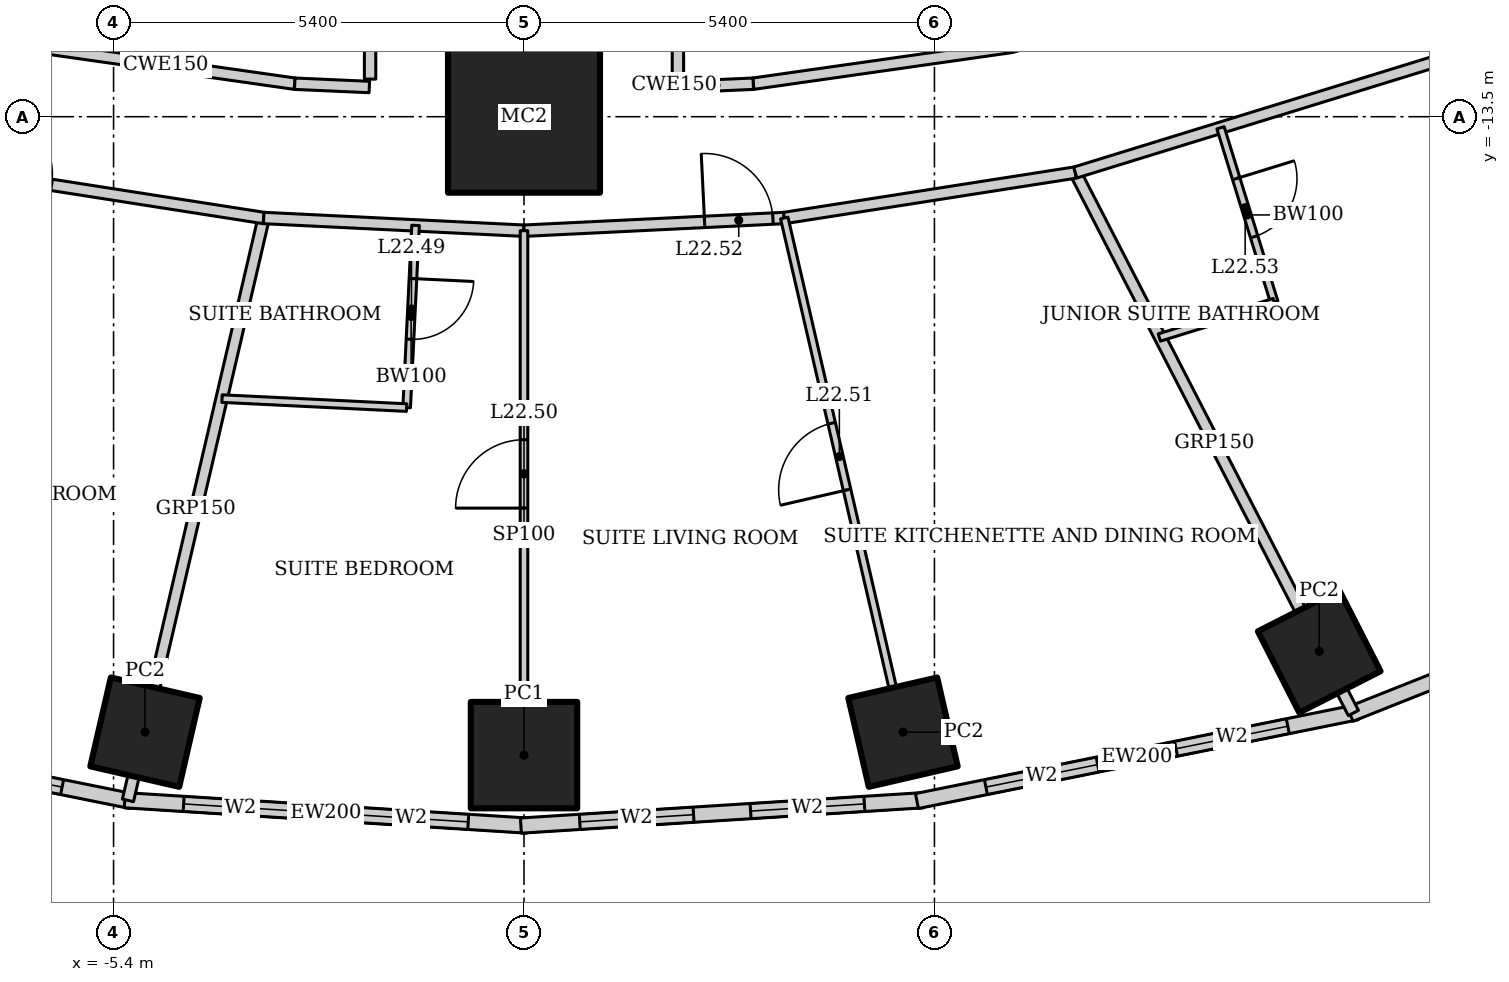
"""IFC4 building model, lengths in metres.
Left out: names, types, materials, properties, quantities, classifications, styles, units other than length and angle.
Written with IfcOpenShell. Run it as: python <this file> out.ifc"""

import sys

from ifc_helpers import new_model, si_unit, direction, frame, frame_2d, origin, origin_2d, place, context, subcontext, project, spatial, rectangle, hollow_rectangle, extrude, element, fill, save


model = new_model("IFC4")
c1 = context("Model", 3, precision=1e-05, world=origin(), true_north=direction((0.0, 1.0)))
c2 = subcontext(c1, "Body", "Model", "MODEL_VIEW")
j1 = project(units=[si_unit("LENGTHUNIT", "METRE"), si_unit("PLANEANGLEUNIT", "RADIAN")], contexts=[c1])
p1 = place(None, origin())
s1 = spatial("IfcSite", under=j1, at=p1, CompositionType="ELEMENT")
p2 = place(p1, origin())
s2 = spatial("IfcBuilding", under=s1, at=p2, CompositionType="ELEMENT")
p3 = place(p2, frame((0.0, 0.0, 94.6)))
s3 = spatial("IfcBuildingStorey", under=s2, at=p3, CompositionType="ELEMENT", Elevation=94.6)
p4 = place(p3, frame((0.0, -13.5, 0.0), z_axis=(0.0, 0.0, 1.0), x_axis=(1.0, 0.0, 0.0)))
e1 = element("IfcColumn", 1, at=p4, inside=s3, PredefinedType="COLUMN", context=c2, shape_type="SweptSolid", body=[
    extrude(hollow_rectangle(XDim=2.0, YDim=2.0, WallThickness=0.17, at=origin_2d()), origin(), (0.0, 0.0, 1.0), 3.6),
])
p5 = place(p3, frame((-4.986, -21.598, 0.0), z_axis=(0.0, 0.0, 1.0), x_axis=(0.224951054344, 0.974370064785, 0.0)))
e2 = element("IfcColumn", 2, at=p5, inside=s3, PredefinedType="COLUMN", context=c2, shape_type="SweptSolid", body=[
    extrude(hollow_rectangle(XDim=1.2, YDim=1.2, WallThickness=0.1, at=origin_2d()), origin(), (0.0, 0.0, 1.0), 3.6),
])
p6 = place(p3, frame((0.0, -21.9, 0.0), z_axis=(0.0, 0.0, 1.0), x_axis=(1.0, 0.0, 0.0)))
e3 = element("IfcColumn", 3, at=p6, inside=s3, PredefinedType="COLUMN", context=c2, shape_type="SweptSolid", body=[
    extrude(hollow_rectangle(XDim=1.4, YDim=1.4, WallThickness=0.1, at=origin_2d()), origin(), (0.0, 0.0, 1.0), 3.6),
])
for number, where, z_axis, x_axis in (
    (4, (4.986, -21.598, 0.0), (0.0, 0.0, 1.0), (0.974, 0.225, 0.0)),
    (5, (10.463, -20.534, 0.0), (0.0, 0.0, 1.0), (0.891, 0.454, 0.0)),
):
    element("IfcColumn", number, at=place(p3, frame(where, z_axis=z_axis, x_axis=x_axis)), inside=s3, PredefinedType="COLUMN", context=c2, shape_type="SweptSolid", body=[
        extrude(hollow_rectangle(XDim=1.2, YDim=1.2, WallThickness=0.1, at=origin_2d()), origin(), (0.0, 0.0, 1.0), 3.6),
    ])
p7 = place(p3, frame((-10.957, -21.337, 0.0), z_axis=(0.0, 0.0, 1.0), x_axis=(0.980251657452, -0.197754110105, 0.0)))
e6 = element("IfcWall", 6, at=p7, inside=s3, PredefinedType="SOLIDWALL", context=c2, shape_type="SweptSolid", body=[
    extrude(rectangle(XDim=5.904, YDim=0.2, at=frame_2d((2.952, 0.0))), origin(), (0.0, 0.0, 1.0), 3.45),
])
p8 = place(p7, frame((0.926, 0.0, 0.5)))
e7 = element("IfcOpeningElement", 7, at=p8, cuts=e6, PredefinedType="OPENING", context=c2, shape_type="SweptSolid", body=[
    extrude(rectangle(XDim=1.5, YDim=2.2, at=frame_2d((0.75, 1.1))), frame((0.0, 0.11, 0.0), z_axis=(0.0, -1.0, 0.0), x_axis=(1.0, 0.0, 0.0)), (0.0, 0.0, 1.0), 0.22),
])
p9 = place(p7, frame((3.478, 0.0, 0.5)))
e8 = element("IfcOpeningElement", 8, at=p9, cuts=e6, PredefinedType="OPENING", context=c2, shape_type="SweptSolid", body=[
    extrude(rectangle(XDim=1.5, YDim=2.2, at=frame_2d((0.75, 1.1))), frame((0.0, 0.11, 0.0), z_axis=(0.0, -1.0, 0.0), x_axis=(1.0, 0.0, 0.0)), (0.0, 0.0, 1.0), 0.22),
])
p10 = place(p3, frame((-5.253, -22.493, 0.0), z_axis=(0.0, 0.0, 1.0), x_axis=(0.998018582375, -0.062919863585, 0.0)))
e9 = element("IfcWall", 9, at=p10, inside=s3, PredefinedType="SOLIDWALL", context=c2, shape_type="SweptSolid", body=[
    extrude(rectangle(XDim=5.304, YDim=0.2, at=frame_2d((2.652, 0.0))), origin(), (0.0, 0.0, 1.0), 3.45),
])
p11 = place(p10, frame((0.776, 0.0, 0.5)))
e10 = element("IfcOpeningElement", 10, at=p11, cuts=e9, PredefinedType="OPENING", context=c2, shape_type="SweptSolid", body=[
    extrude(rectangle(XDim=1.5, YDim=2.2, at=frame_2d((0.75, 1.1))), frame((0.0, 0.11, 0.0), z_axis=(0.0, -1.0, 0.0), x_axis=(1.0, 0.0, 0.0)), (0.0, 0.0, 1.0), 0.22),
])
p12 = place(p10, frame((3.028, 0.0, 0.5)))
e11 = element("IfcOpeningElement", 11, at=p12, cuts=e9, PredefinedType="OPENING", context=c2, shape_type="SweptSolid", body=[
    extrude(rectangle(XDim=1.5, YDim=2.2, at=frame_2d((0.75, 1.1))), frame((0.0, 0.11, 0.0), z_axis=(0.0, -1.0, 0.0), x_axis=(1.0, 0.0, 0.0)), (0.0, 0.0, 1.0), 0.22),
])
p13 = place(p3, frame((-0.041, -22.827, 0.0), z_axis=(0.0, 0.0, 1.0), x_axis=(0.998018582375, 0.062919863585, 0.0)))
e12 = element("IfcWall", 12, at=p13, inside=s3, PredefinedType="SOLIDWALL", context=c2, shape_type="SweptSolid", body=[
    extrude(rectangle(XDim=5.304, YDim=0.2, at=frame_2d((2.652, 0.0))), origin(), (0.0, 0.0, 1.0), 3.45),
])
p14 = place(p13, frame((0.776, 0.0, 0.5)))
e13 = element("IfcOpeningElement", 13, at=p14, cuts=e12, PredefinedType="OPENING", context=c2, shape_type="SweptSolid", body=[
    extrude(rectangle(XDim=1.5, YDim=2.2, at=frame_2d((0.75, 1.1))), frame((0.0, 0.11, 0.0), z_axis=(0.0, -1.0, 0.0), x_axis=(1.0, 0.0, 0.0)), (0.0, 0.0, 1.0), 0.22),
])
p15 = place(p13, frame((3.028, 0.0, 0.5)))
e14 = element("IfcOpeningElement", 14, at=p15, cuts=e12, PredefinedType="OPENING", context=c2, shape_type="SweptSolid", body=[
    extrude(rectangle(XDim=1.5, YDim=2.2, at=frame_2d((0.75, 1.1))), frame((0.0, 0.11, 0.0), z_axis=(0.0, -1.0, 0.0), x_axis=(1.0, 0.0, 0.0)), (0.0, 0.0, 1.0), 0.22),
])
p16 = place(p3, frame((5.17, -22.504, 0.0), z_axis=(0.0, 0.0, 1.0), x_axis=(0.980251657452, 0.197754110105, 0.0)))
e15 = element("IfcWall", 15, at=p16, inside=s3, PredefinedType="SOLIDWALL", context=c2, shape_type="SweptSolid", body=[
    extrude(rectangle(XDim=5.904, YDim=0.2, at=frame_2d((2.952, 0.0))), origin(), (0.0, 0.0, 1.0), 3.45),
])
p17 = place(p16, frame((0.926, 0.0, 0.5)))
e16 = element("IfcOpeningElement", 16, at=p17, cuts=e15, PredefinedType="OPENING", context=c2, shape_type="SweptSolid", body=[
    extrude(rectangle(XDim=1.5, YDim=2.2, at=frame_2d((0.75, 1.1))), frame((0.0, 0.11, 0.0), z_axis=(0.0, -1.0, 0.0), x_axis=(1.0, 0.0, 0.0)), (0.0, 0.0, 1.0), 0.22),
])
p18 = place(p16, frame((3.478, 0.0, 0.5)))
e17 = element("IfcOpeningElement", 17, at=p18, cuts=e15, PredefinedType="OPENING", context=c2, shape_type="SweptSolid", body=[
    extrude(rectangle(XDim=1.5, YDim=2.2, at=frame_2d((0.75, 1.1))), frame((0.0, 0.11, 0.0), z_axis=(0.0, -1.0, 0.0), x_axis=(1.0, 0.0, 0.0)), (0.0, 0.0, 1.0), 0.22),
])
p19 = place(p3, frame((10.869, -21.363, 0.0), z_axis=(0.0, 0.0, 1.0), x_axis=(0.929358351251, 0.369178892895, 0.0)))
e18 = element("IfcWall", 18, at=p19, inside=s3, PredefinedType="SOLIDWALL", context=c2, shape_type="SweptSolid", body=[
    extrude(rectangle(XDim=7.692, YDim=0.2, at=frame_2d((3.846, 0.0))), origin(), (0.0, 0.0, 1.0), 3.45),
])
p20 = place(p19, frame((1.373, 0.0, 0.5)))
e19 = element("IfcOpeningElement", 19, at=p20, cuts=e18, PredefinedType="OPENING", context=c2, shape_type="SweptSolid", body=[
    extrude(rectangle(XDim=1.5, YDim=2.2, at=frame_2d((0.75, 1.1))), frame((0.0, 0.11, 0.0), z_axis=(0.0, -1.0, 0.0), x_axis=(1.0, 0.0, 0.0)), (0.0, 0.0, 1.0), 0.22),
])
p21 = place(p19, frame((4.819, 0.0, 0.5)))
e20 = element("IfcOpeningElement", 20, at=p21, cuts=e18, PredefinedType="OPENING", context=c2, shape_type="SweptSolid", body=[
    extrude(rectangle(XDim=1.5, YDim=2.2, at=frame_2d((0.75, 1.1))), frame((0.0, 0.11, 0.0), z_axis=(0.0, -1.0, 0.0), x_axis=(1.0, 0.0, 0.0)), (0.0, 0.0, 1.0), 0.22),
])
p22 = place(p3, frame((-5.211, -22.496, 0.0), z_axis=(0.0, 0.0, 1.0), x_axis=(0.227056984461, 0.973881474209, 0.0)))
e21 = element("IfcWall", 21, at=p22, inside=s3, PredefinedType="PARTITIONING", context=c2, shape_type="SweptSolid", body=[
    extrude(rectangle(XDim=7.869, YDim=0.15, at=frame_2d((3.934, 0.0))), origin(), (0.0, 0.0, 1.0), 2.767),
])
p23 = place(p3, frame((10.912, -21.346, 0.0), z_axis=(0.0, 0.0, 1.0), x_axis=(-0.45752665959, 0.889195904042, 0.0)))
e22 = element("IfcWall", 22, at=p23, inside=s3, PredefinedType="PARTITIONING", context=c2, shape_type="SweptSolid", body=[
    extrude(rectangle(XDim=7.997, YDim=0.15, at=frame_2d((3.999, 0.0))), origin(), (0.0, 0.0, 1.0), 2.528),
])
p24 = place(p3, frame((-7.253, -14.235, 0.0), z_axis=(0.0, 0.0, 1.0), x_axis=(0.988015036573, -0.154357660987, 0.0)))
e23 = element("IfcWall", 23, at=p24, inside=s3, PredefinedType="PARTITIONING", context=c2, shape_type="SweptSolid", body=[
    extrude(rectangle(XDim=3.875, YDim=0.15, at=frame_2d((1.938, 0.0))), origin(), (0.0, 0.0, 1.0), 3.45),
])
p25 = place(p24, frame((0.15, 0.0, 0.0)))
e24 = element("IfcOpeningElement", 24, at=p25, cuts=e23, PredefinedType="OPENING", context=c2, shape_type="SweptSolid", body=[
    extrude(rectangle(XDim=0.9, YDim=2.1, at=frame_2d((0.45, 1.05))), frame((0.0, 0.085, 0.0), z_axis=(0.0, -1.0, 0.0), x_axis=(1.0, 0.0, 0.0)), (0.0, 0.0, 1.0), 0.17),
])
p26 = place(p3, frame((-3.424, -14.833, 0.0), z_axis=(0.0, 0.0, 1.0), x_axis=(0.998809560203, -0.048779733975, 0.0)))
e25 = element("IfcWall", 25, at=p26, inside=s3, PredefinedType="PARTITIONING", context=c2, shape_type="SweptSolid", body=[
    extrude(rectangle(XDim=3.428, YDim=0.15, at=frame_2d((1.714, 0.0))), origin(), (0.0, 0.0, 1.0), 3.45),
])
p27 = place(p3, frame((0.0, -15.0, 0.0), z_axis=(0.0, 0.0, 1.0), x_axis=(0.998809560203, 0.048779733975, 0.0)))
e26 = element("IfcWall", 26, at=p27, inside=s3, PredefinedType="PARTITIONING", context=c2, shape_type="SweptSolid", body=[
    extrude(rectangle(XDim=3.428, YDim=0.15, at=frame_2d((1.714, 0.0))), origin(), (0.0, 0.0, 1.0), 3.45),
])
p28 = place(p27, frame((2.378, 0.0, 0.0)))
e27 = element("IfcOpeningElement", 27, at=p28, cuts=e26, PredefinedType="OPENING", context=c2, shape_type="SweptSolid", body=[
    extrude(rectangle(XDim=0.9, YDim=2.1, at=frame_2d((0.45, 1.05))), frame((0.0, 0.085, 0.0), z_axis=(0.0, -1.0, 0.0), x_axis=(1.0, 0.0, 0.0)), (0.0, 0.0, 1.0), 0.17),
])
p29 = place(p3, frame((3.424, -14.833, 0.0), z_axis=(0.0, 0.0, 1.0), x_axis=(0.988015036573, 0.154357660987, 0.0)))
e28 = element("IfcWall", 28, at=p29, inside=s3, PredefinedType="PARTITIONING", context=c2, shape_type="SweptSolid", body=[
    extrude(rectangle(XDim=3.875, YDim=0.15, at=frame_2d((1.938, 0.0))), origin(), (0.0, 0.0, 1.0), 3.45),
])
p30 = place(p3, frame((7.253, -14.235, 0.0), z_axis=(0.0, 0.0, 1.0), x_axis=(0.955657956744, 0.294478980085, 0.0)))
e29 = element("IfcWall", 29, at=p30, inside=s3, PredefinedType="PARTITIONING", context=c2, shape_type="SweptSolid", body=[
    extrude(rectangle(XDim=5.236, YDim=0.15, at=frame_2d((2.618, 0.0))), origin(), (0.0, 0.0, 1.0), 3.45),
])
for number, where, z_axis, x_axis in (
    (30, (-6.411, -12.582, 0.0), (0.0, 0.0, 1.0), (0.99, -0.141, 0.0)),
    (31, (3.016, -13.066, 0.0), (0.0, 0.0, 1.0), (0.99, 0.141, 0.0)),
):
    element("IfcWall", number, at=place(p3, frame(where, z_axis=z_axis, x_axis=x_axis)), inside=s3, PredefinedType="PARTITIONING", context=c2, shape_type="SweptSolid", body=[
        extrude(rectangle(XDim=3.429, YDim=0.15, at=frame_2d((1.714, 0.0))), origin(), (0.0, 0.0, 1.0), 3.45),
    ])
p31 = place(p3, frame((6.411, -12.582, 0.0), z_axis=(0.0, 0.0, 1.0), x_axis=(0.962643729928, 0.270771211967, 0.0)))
e32 = element("IfcWall", 32, at=p31, inside=s3, PredefinedType="PARTITIONING", context=c2, shape_type="SweptSolid", body=[
    extrude(rectangle(XDim=4.688, YDim=0.15, at=frame_2d((2.344, 0.0))), origin(), (0.0, 0.0, 1.0), 3.45),
])
p32 = place(p31, frame((1.894, 0.0, 0.0)))
e33 = element("IfcOpeningElement", 33, at=p32, cuts=e32, PredefinedType="OPENING", context=c2, shape_type="SweptSolid", body=[
    extrude(rectangle(XDim=0.9, YDim=2.1, at=frame_2d((0.45, 1.05))), frame((0.0, 0.085, 0.0), z_axis=(0.0, -1.0, 0.0), x_axis=(1.0, 0.0, 0.0)), (0.0, 0.0, 1.0), 0.17),
])
p33 = place(p3, frame((-1.427, -14.93, 0.0), z_axis=(0.0, 0.0, 1.0), x_axis=(-0.048831470304, -0.998807032168, 0.0)))
e34 = element("IfcWall", 34, at=p33, inside=s3, PredefinedType="PARTITIONING", context=c2, shape_type="SweptSolid", body=[
    extrude(rectangle(XDim=2.4, YDim=0.1, at=frame_2d((1.2, 0.0))), origin(), (0.0, 0.0, 1.0), 3.45),
])
p34 = place(p33, frame((0.7, 0.0, 0.0)))
e35 = element("IfcOpeningElement", 35, at=p34, cuts=e34, PredefinedType="OPENING", context=c2, shape_type="SweptSolid", body=[
    extrude(rectangle(XDim=0.8, YDim=2.1, at=frame_2d((0.4, 1.05))), frame((0.0, 0.06, 0.0), z_axis=(0.0, -1.0, 0.0), x_axis=(1.0, 0.0, 0.0)), (0.0, 0.0, 1.0), 0.12),
])
p35 = place(p3, frame((-1.544, -17.327, 0.0), z_axis=(0.0, 0.0, 1.0), x_axis=(-0.998813899717, 0.048690797202, 0.0)))
e36 = element("IfcWall", 36, at=p35, inside=s3, PredefinedType="PARTITIONING", context=c2, shape_type="SweptSolid", body=[
    extrude(rectangle(XDim=2.432, YDim=0.1, at=frame_2d((1.216, 0.0))), origin(), (0.0, 0.0, 1.0), 3.45),
])
p36 = place(p3, frame((0.0, -21.4, 0.0), z_axis=(0.0, 0.0, 1.0), x_axis=(0.0, 1.0, 0.0)))
e37 = element("IfcWall", 37, at=p36, inside=s3, PredefinedType="PARTITIONING", context=c2, shape_type="SweptSolid", body=[
    extrude(rectangle(XDim=6.4, YDim=0.1, at=frame_2d((3.2, 0.0))), origin(), (0.0, 0.0, 1.0), 2.924),
])
p37 = place(p36, frame((2.75, 0.0, 0.0)))
e38 = element("IfcOpeningElement", 38, at=p37, cuts=e37, PredefinedType="OPENING", context=c2, shape_type="SweptSolid", body=[
    extrude(rectangle(XDim=0.9, YDim=2.1, at=frame_2d((0.45, 1.05))), frame((0.0, 0.06, 0.0), z_axis=(0.0, -1.0, 0.0), x_axis=(1.0, 0.0, 0.0)), (0.0, 0.0, 1.0), 0.12),
])
p38 = place(p3, frame((4.874, -21.111, 0.0), z_axis=(0.0, 0.0, 1.0), x_axis=(-0.224959129168, 0.97436820053, 0.0)))
e39 = element("IfcWall", 39, at=p38, inside=s3, PredefinedType="PARTITIONING", context=c2, shape_type="SweptSolid", body=[
    extrude(rectangle(XDim=6.443, YDim=0.1, at=frame_2d((3.222, 0.0))), origin(), (0.0, 0.0, 1.0), 2.767),
])
p39 = place(p38, frame((2.771, 0.0, 0.0)))
e40 = element("IfcOpeningElement", 40, at=p39, cuts=e39, PredefinedType="OPENING", context=c2, shape_type="SweptSolid", body=[
    extrude(rectangle(XDim=0.9, YDim=2.1, at=frame_2d((0.45, 1.05))), frame((0.0, 0.06, 0.0), z_axis=(0.0, -1.0, 0.0), x_axis=(1.0, 0.0, 0.0)), (0.0, 0.0, 1.0), 0.12),
])
p40 = place(p3, frame((9.164, -13.646, 0.0), z_axis=(0.0, 0.0, 1.0), x_axis=(0.294507586191, -0.955649141514, 0.0)))
e41 = element("IfcWall", 41, at=p40, inside=s3, PredefinedType="PARTITIONING", context=c2, shape_type="SweptSolid", body=[
    extrude(rectangle(XDim=2.4, YDim=0.1, at=frame_2d((1.2, 0.0))), origin(), (0.0, 0.0, 1.0), 3.45),
])
p41 = place(p40, frame((0.7, 0.0, 0.0)))
e42 = element("IfcOpeningElement", 42, at=p41, cuts=e41, PredefinedType="OPENING", context=c2, shape_type="SweptSolid", body=[
    extrude(rectangle(XDim=0.8, YDim=2.1, at=frame_2d((0.4, 1.05))), frame((0.0, 0.06, 0.0), z_axis=(0.0, -1.0, 0.0), x_axis=(1.0, 0.0, 0.0)), (0.0, 0.0, 1.0), 0.12),
])
p42 = place(p3, frame((9.871, -15.939, 0.0), z_axis=(0.0, 0.0, 1.0), x_axis=(-0.955642133669, -0.29453032502, 0.0)))
e43 = element("IfcWall", 43, at=p42, inside=s3, PredefinedType="PARTITIONING", context=c2, shape_type="SweptSolid", body=[
    extrude(rectangle(XDim=1.583, YDim=0.1, at=frame_2d((0.791, 0.0))), origin(), (0.0, 0.0, 1.0), 3.45),
])
for number, where, z_axis, x_axis in (
    (44, (-3.016, -13.066, 0.0), (0.0, 0.0, 1.0), (0.999, -0.044, 0.0)),
    (45, (2.035, -13.109, 0.0), (0.0, 0.0, 1.0), (0.999, 0.044, 0.0)),
):
    element("IfcWall", number, at=place(p3, frame(where, z_axis=z_axis, x_axis=x_axis)), inside=s3, PredefinedType="PARTITIONING", context=c2, shape_type="SweptSolid", body=[
        extrude(rectangle(XDim=0.982, YDim=0.15, at=frame_2d((0.491, 0.0))), origin(), (0.0, 0.0, 1.0), 3.45),
    ])
for number, where, z_axis, x_axis in (
    (46, (-2.025, -13.005, 0.0), (0.0, 0.0, 1.0), (0.0, 1.0, 0.0)),
    (47, (2.025, -12.075, 0.0), (0.0, 0.0, 1.0), (0.0, -1.0, 0.0)),
):
    element("IfcWall", number, at=place(p3, frame(where, z_axis=z_axis, x_axis=x_axis)), inside=s3, PredefinedType="PARTITIONING", context=c2, shape_type="SweptSolid", body=[
        extrude(rectangle(XDim=0.93, YDim=0.15, at=frame_2d((0.465, 0.0))), origin(), (0.0, 0.0, 1.0), 2.749),
    ])
p43 = place(p9, origin())
e48 = element("IfcWindow", 48, at=p43, inside=s3, PartitioningType="SINGLE_PANEL", PredefinedType="WINDOW", context=c2, shape_type="SweptSolid", body=[
    extrude(rectangle(XDim=1.5, YDim=2.2, at=frame_2d((0.75, 1.1))), frame((0.0, 0.03, 0.0), z_axis=(0.0, -1.0, 0.0), x_axis=(1.0, 0.0, 0.0)), (0.0, 0.0, 1.0), 0.06),
])
fill(e8, e48)
p44 = place(p11, origin())
e49 = element("IfcWindow", 49, at=p44, inside=s3, PartitioningType="SINGLE_PANEL", PredefinedType="WINDOW", context=c2, shape_type="SweptSolid", body=[
    extrude(rectangle(XDim=1.5, YDim=2.2, at=frame_2d((0.75, 1.1))), frame((0.0, 0.03, 0.0), z_axis=(0.0, -1.0, 0.0), x_axis=(1.0, 0.0, 0.0)), (0.0, 0.0, 1.0), 0.06),
])
fill(e10, e49)
p45 = place(p12, origin())
e50 = element("IfcWindow", 50, at=p45, inside=s3, PartitioningType="SINGLE_PANEL", PredefinedType="WINDOW", context=c2, shape_type="SweptSolid", body=[
    extrude(rectangle(XDim=1.5, YDim=2.2, at=frame_2d((0.75, 1.1))), frame((0.0, 0.03, 0.0), z_axis=(0.0, -1.0, 0.0), x_axis=(1.0, 0.0, 0.0)), (0.0, 0.0, 1.0), 0.06),
])
fill(e11, e50)
p46 = place(p14, origin())
e51 = element("IfcWindow", 51, at=p46, inside=s3, PartitioningType="SINGLE_PANEL", PredefinedType="WINDOW", context=c2, shape_type="SweptSolid", body=[
    extrude(rectangle(XDim=1.5, YDim=2.2, at=frame_2d((0.75, 1.1))), frame((0.0, 0.03, 0.0), z_axis=(0.0, -1.0, 0.0), x_axis=(1.0, 0.0, 0.0)), (0.0, 0.0, 1.0), 0.06),
])
fill(e13, e51)
p47 = place(p15, origin())
e52 = element("IfcWindow", 52, at=p47, inside=s3, PartitioningType="SINGLE_PANEL", PredefinedType="WINDOW", context=c2, shape_type="SweptSolid", body=[
    extrude(rectangle(XDim=1.5, YDim=2.2, at=frame_2d((0.75, 1.1))), frame((0.0, 0.03, 0.0), z_axis=(0.0, -1.0, 0.0), x_axis=(1.0, 0.0, 0.0)), (0.0, 0.0, 1.0), 0.06),
])
fill(e14, e52)
p48 = place(p17, origin())
e53 = element("IfcWindow", 53, at=p48, inside=s3, PartitioningType="SINGLE_PANEL", PredefinedType="WINDOW", context=c2, shape_type="SweptSolid", body=[
    extrude(rectangle(XDim=1.5, YDim=2.2, at=frame_2d((0.75, 1.1))), frame((0.0, 0.03, 0.0), z_axis=(0.0, -1.0, 0.0), x_axis=(1.0, 0.0, 0.0)), (0.0, 0.0, 1.0), 0.06),
])
fill(e16, e53)
p49 = place(p18, origin())
e54 = element("IfcWindow", 54, at=p49, inside=s3, PartitioningType="SINGLE_PANEL", PredefinedType="WINDOW", context=c2, shape_type="SweptSolid", body=[
    extrude(rectangle(XDim=1.5, YDim=2.2, at=frame_2d((0.75, 1.1))), frame((0.0, 0.03, 0.0), z_axis=(0.0, -1.0, 0.0), x_axis=(1.0, 0.0, 0.0)), (0.0, 0.0, 1.0), 0.06),
])
fill(e17, e54)
p50 = place(p34, origin())
e55 = element("IfcDoor", 55, at=p50, inside=s3, OperationType="SINGLE_SWING_LEFT", PredefinedType="DOOR", context=c2, shape_type="SweptSolid", body=[
    extrude(rectangle(XDim=0.8, YDim=2.1, at=frame_2d((0.4, 1.05))), frame((0.0, 0.025, 0.0), z_axis=(0.0, -1.0, 0.0), x_axis=(1.0, 0.0, 0.0)), (0.0, 0.0, 1.0), 0.05),
])
fill(e35, e55)
p51 = place(p37, origin())
e56 = element("IfcDoor", 56, at=p51, inside=s3, OperationType="SINGLE_SWING_LEFT", PredefinedType="DOOR", context=c2, shape_type="SweptSolid", body=[
    extrude(rectangle(XDim=0.9, YDim=2.1, at=frame_2d((0.45, 1.05))), frame((0.0, 0.025, 0.0), z_axis=(0.0, -1.0, 0.0), x_axis=(1.0, 0.0, 0.0)), (0.0, 0.0, 1.0), 0.05),
])
fill(e38, e56)
p52 = place(p39, origin())
e57 = element("IfcDoor", 57, at=p52, inside=s3, OperationType="SINGLE_SWING_LEFT", PredefinedType="DOOR", context=c2, shape_type="SweptSolid", body=[
    extrude(rectangle(XDim=0.9, YDim=2.1, at=frame_2d((0.45, 1.05))), frame((0.0, 0.025, 0.0), z_axis=(0.0, -1.0, 0.0), x_axis=(1.0, 0.0, 0.0)), (0.0, 0.0, 1.0), 0.05),
])
fill(e40, e57)
p53 = place(p28, origin())
e58 = element("IfcDoor", 58, at=p53, inside=s3, OperationType="SINGLE_SWING_LEFT", PredefinedType="DOOR", context=c2, shape_type="SweptSolid", body=[
    extrude(rectangle(XDim=0.9, YDim=2.1, at=frame_2d((0.45, 1.05))), frame((0.0, 0.025, 0.0), z_axis=(0.0, -1.0, 0.0), x_axis=(1.0, 0.0, 0.0)), (0.0, 0.0, 1.0), 0.05),
])
fill(e27, e58)
p54 = place(p41, origin())
e59 = element("IfcDoor", 59, at=p54, inside=s3, OperationType="SINGLE_SWING_LEFT", PredefinedType="DOOR", context=c2, shape_type="SweptSolid", body=[
    extrude(rectangle(XDim=0.8, YDim=2.1, at=frame_2d((0.4, 1.05))), frame((0.0, 0.025, 0.0), z_axis=(0.0, -1.0, 0.0), x_axis=(1.0, 0.0, 0.0)), (0.0, 0.0, 1.0), 0.05),
])
fill(e42, e59)
save(model, sys.argv[1])
